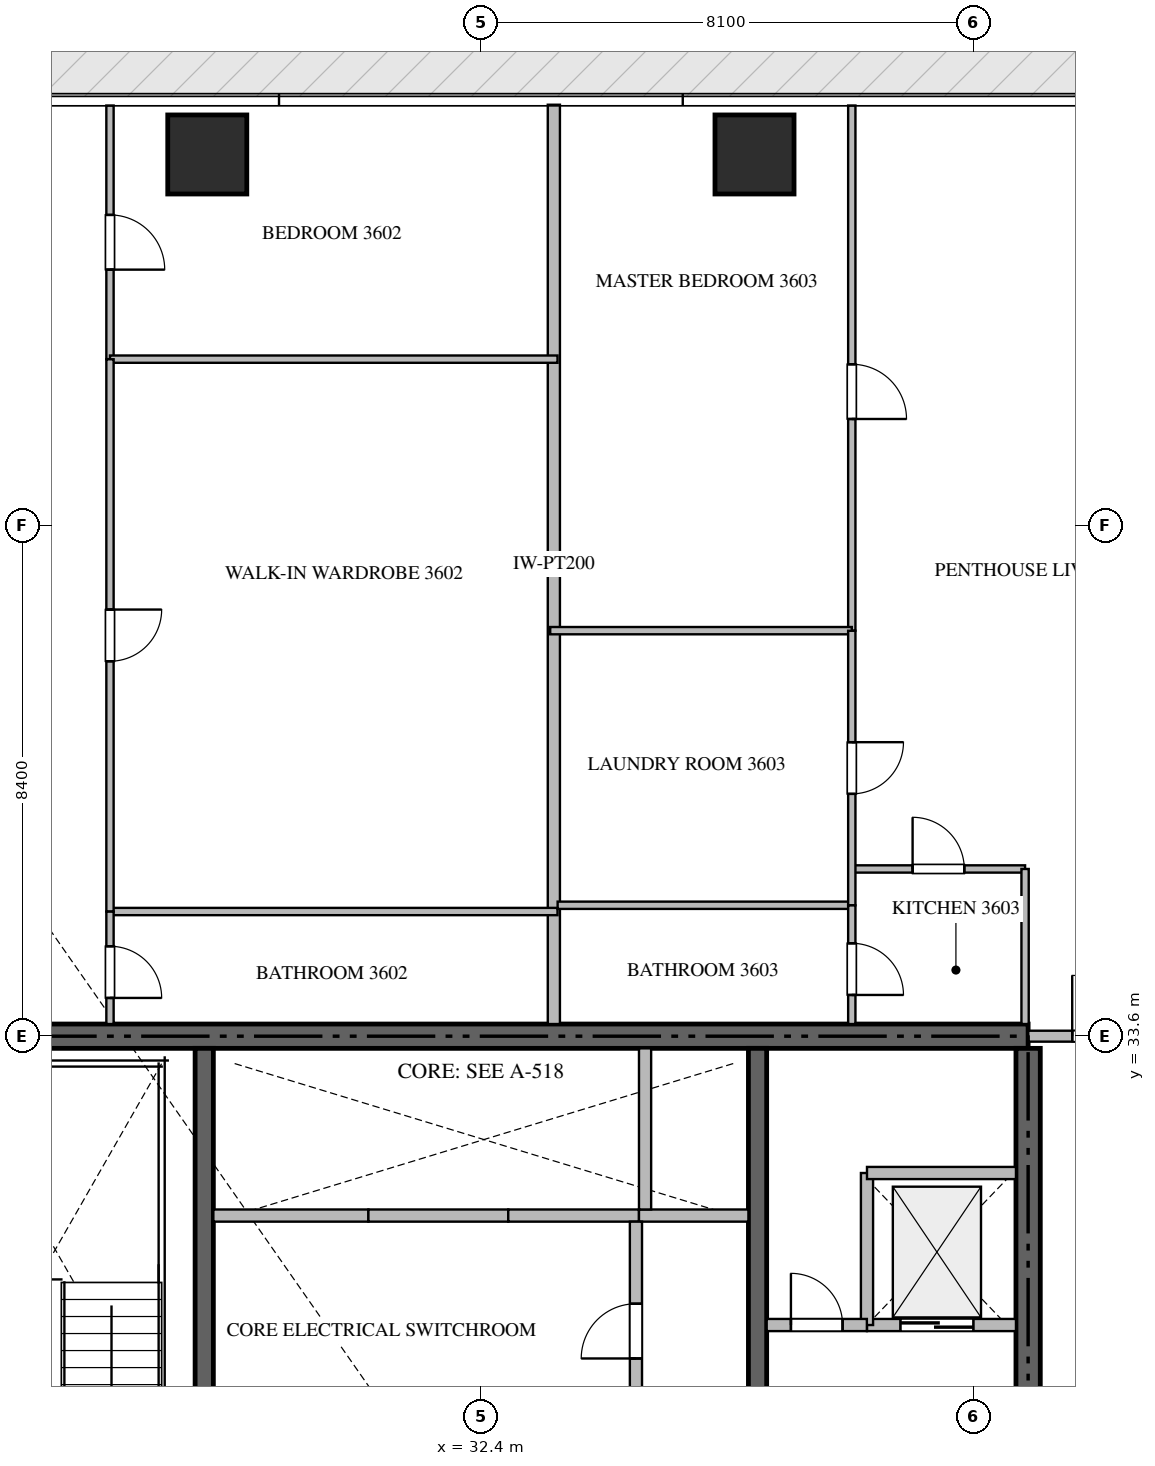
"""IFC4 building model, lengths in metres.
Left out: names, types, materials, properties, quantities, classifications, styles, units other than length and angle.
Written with IfcOpenShell. Run it as: python <this file> out.ifc"""

import sys

from ifc_helpers import new_model, si_unit, direction, frame, frame_2d, origin, origin_2d, place, context, subcontext, project, spatial, rectangle, extrude, source, transform, mapped, element, fill, save


model = new_model("IFC4")
c1 = context("Model", 3, precision=1e-05, world=origin(), true_north=direction((0.0, 1.0)))
c2 = subcontext(c1, "Body", "Model", "MODEL_VIEW")
j1 = project(units=[si_unit("LENGTHUNIT", "METRE"), si_unit("PLANEANGLEUNIT", "RADIAN")], contexts=[c1])
p1 = place(None, origin())
s1 = spatial("IfcSite", under=j1, at=p1, CompositionType="ELEMENT")
p2 = place(p1, origin())
s2 = spatial("IfcBuilding", under=s1, at=p2, CompositionType="ELEMENT")
p3 = place(p2, frame((0.0, 0.0, 146.4)))
s3 = spatial("IfcBuildingStorey", under=s2, at=p3, CompositionType="ELEMENT", Elevation=146.4)
p4 = place(p3, frame((41.4, 33.6, -0.26), z_axis=(0.0, 0.0, 1.0), x_axis=(-1.0, 0.0, 0.0)))
e1 = element("IfcWall", 1, at=p4, inside=s3, PredefinedType="SHEAR", context=c2, shape_type="SweptSolid", body=[
    extrude(rectangle(XDim=18.0, YDim=0.4, at=frame_2d((9.0, 0.0))), origin(), (0.0, 0.0, 1.0), 3.748),
])
p5 = place(p3, frame((41.4, 27.75, -0.26), z_axis=(0.0, 0.0, 1.0), x_axis=(0.0, 1.0, 0.0)))
e2 = element("IfcWall", 2, at=p5, inside=s3, PredefinedType="SHEAR", context=c2, shape_type="SweptSolid", body=[
    extrude(rectangle(XDim=5.65, YDim=0.4, at=frame_2d((2.825, 0.0))), origin(), (0.0, 0.0, 1.0), 3.748),
])
p6 = place(p3, frame((27.85, 23.55, -0.26), z_axis=(0.0, 0.0, 1.0), x_axis=(0.0, 1.0, 0.0)))
e3 = element("IfcWall", 3, at=p6, inside=s3, PredefinedType="SHEAR", context=c2, shape_type="SweptSolid", body=[
    extrude(rectangle(XDim=9.85, YDim=0.3, at=frame_2d((4.925, 0.0))), origin(), (0.0, 0.0, 1.0), 3.748),
])
p7 = place(p3, frame((36.95, 27.05, -0.26), z_axis=(0.0, 0.0, 1.0), x_axis=(0.0, 1.0, 0.0)))
e4 = element("IfcWall", 4, at=p7, inside=s3, PredefinedType="SHEAR", context=c2, shape_type="SweptSolid", body=[
    extrude(rectangle(XDim=6.35, YDim=0.3, at=frame_2d((3.175, 0.0))), origin(), (0.0, 0.0, 1.0), 3.748),
])
m1 = source(origin(), c2, "Body", "SweptSolid", [
    extrude(rectangle(XDim=1.3, YDim=1.3, at=origin_2d()), origin(), (0.0, 0.0, 1.0), 3.75),
])
for number, where, z_axis, x_axis in (
    (5, (27.9, 48.1, -0.26), (0.0, 0.0, 1.0), (1.0, 0.0, 0.0)),
    (6, (36.9, 48.1, -0.26), (0.0, 0.0, 1.0), (1.0, 0.0, 0.0)),
):
    element("IfcColumn", number, at=place(p3, frame(where, z_axis=z_axis, x_axis=x_axis)), inside=s3, PredefinedType="COLUMN", context=c2, shape_type="MappedRepresentation", body=[
        mapped(m1, transform((0.0, 0.0, 0.0), scale=1.0)),
    ])
p8 = place(p3, frame((38.75, 28.85, 0.0), z_axis=(0.0, 0.0, 1.0), x_axis=(1.0, 0.0, 0.0)))
e7 = element("IfcWall", 7, at=p8, inside=s3, PredefinedType="STANDARD", context=c2, shape_type="SweptSolid", body=[
    extrude(rectangle(XDim=2.45, YDim=0.2, at=frame_2d((1.225, 0.0))), origin(), (0.0, 0.0, 1.0), 3.49),
])
p9 = place(p8, frame((0.55, 0.0, 0.0)))
e8 = element("IfcOpeningElement", 8, at=p9, cuts=e7, PredefinedType="OPENING", context=c2, shape_type="SweptSolid", body=[
    extrude(rectangle(XDim=1.2, YDim=2.2, at=frame_2d((0.6, 1.1))), frame((0.0, 0.11, 0.0), z_axis=(0.0, -1.0, 0.0), x_axis=(1.0, 0.0, 0.0)), (0.0, 0.0, 1.0), 0.22),
])
p10 = place(p3, frame((28.0, 30.65, 0.0), z_axis=(0.0, 0.0, 1.0), x_axis=(1.0, 0.0, 0.0)))
e9 = element("IfcWall", 9, at=p10, inside=s3, PredefinedType="STANDARD", context=c2, shape_type="SweptSolid", body=[
    extrude(rectangle(XDim=2.55, YDim=0.2, at=frame_2d((1.275, 0.0))), origin(), (0.0, 0.0, 1.0), 3.49),
])
p11 = place(p3, frame((30.55, 30.65, 0.0), z_axis=(0.0, 0.0, 1.0), x_axis=(1.0, 0.0, 0.0)))
e10 = element("IfcWall", 10, at=p11, inside=s3, PredefinedType="STANDARD", context=c2, shape_type="SweptSolid", body=[
    extrude(rectangle(XDim=2.3, YDim=0.2, at=frame_2d((1.15, 0.0))), origin(), (0.0, 0.0, 1.0), 3.49),
])
p12 = place(p3, frame((32.85, 30.65, 0.0), z_axis=(0.0, 0.0, 1.0), x_axis=(1.0, 0.0, 0.0)))
e11 = element("IfcWall", 11, at=p12, inside=s3, PredefinedType="STANDARD", context=c2, shape_type="SweptSolid", body=[
    extrude(rectangle(XDim=2.15, YDim=0.2, at=frame_2d((1.075, 0.0))), origin(), (0.0, 0.0, 1.0), 3.49),
])
p13 = place(p3, frame((35.0, 30.65, 0.0), z_axis=(0.0, 0.0, 1.0), x_axis=(1.0, 0.0, 0.0)))
e12 = element("IfcWall", 12, at=p13, inside=s3, PredefinedType="STANDARD", context=c2, shape_type="SweptSolid", body=[
    extrude(rectangle(XDim=1.8, YDim=0.2, at=frame_2d((0.9, 0.0))), origin(), (0.0, 0.0, 1.0), 3.49),
])
p14 = place(p3, frame((35.1, 30.75, 0.0), z_axis=(0.0, 0.0, 1.0), x_axis=(0.0, 1.0, 0.0)))
e13 = element("IfcWall", 13, at=p14, inside=s3, PredefinedType="STANDARD", context=c2, shape_type="SweptSolid", body=[
    extrude(rectangle(XDim=2.65, YDim=0.2, at=frame_2d((1.325, 0.0))), origin(), (0.0, 0.0, 1.0), 3.49),
])
p15 = place(p3, frame((38.75, 28.85, 0.0), z_axis=(0.0, 0.0, 1.0), x_axis=(0.0, 1.0, 0.0)))
e14 = element("IfcWall", 14, at=p15, inside=s3, PredefinedType="STANDARD", context=c2, shape_type="SweptSolid", body=[
    extrude(rectangle(XDim=2.5, YDim=0.2, at=frame_2d((1.25, 0.0))), origin(), (0.0, 0.0, 1.0), 3.49),
])
p16 = place(p3, frame((38.75, 31.35, 0.0), z_axis=(0.0, 0.0, 1.0), x_axis=(1.0, 0.0, 0.0)))
e15 = element("IfcWall", 15, at=p16, inside=s3, PredefinedType="STANDARD", context=c2, shape_type="SweptSolid", body=[
    extrude(rectangle(XDim=2.45, YDim=0.2, at=frame_2d((1.225, 0.0))), origin(), (0.0, 0.0, 1.0), 3.49),
])
p17 = place(p3, frame((37.1, 28.85, 0.0), z_axis=(0.0, 0.0, 1.0), x_axis=(1.0, 0.0, 0.0)))
e16 = element("IfcWall", 16, at=p17, inside=s3, PredefinedType="STANDARD", context=c2, shape_type="SweptSolid", body=[
    extrude(rectangle(XDim=1.648, YDim=0.2, at=frame_2d((0.824, 0.0))), origin(), (0.0, 0.0, 1.0), 3.49),
])
p18 = place(p17, frame((0.399, 0.0, 0.0)))
e17 = element("IfcOpeningElement", 17, at=p18, cuts=e16, PredefinedType="OPENING", context=c2, shape_type="SweptSolid", body=[
    extrude(rectangle(XDim=0.85, YDim=2.1, at=frame_2d((0.425, 1.05))), frame((0.0, 0.11, 0.0), z_axis=(0.0, -1.0, 0.0), x_axis=(1.0, 0.0, 0.0)), (0.0, 0.0, 1.0), 0.22),
])
p19 = place(p3, frame((34.95, 26.95, 0.0), z_axis=(0.0, 0.0, 1.0), x_axis=(0.0, 1.0, 0.0)))
e18 = element("IfcWall", 18, at=p19, inside=s3, PredefinedType="STANDARD", context=c2, shape_type="SweptSolid", body=[
    extrude(rectangle(XDim=3.6, YDim=0.2, at=frame_2d((1.8, 0.0))), origin(), (0.0, 0.0, 1.0), 3.49),
])
p20 = place(p19, frame((1.35, 0.0, 0.0)))
e19 = element("IfcOpeningElement", 19, at=p20, cuts=e18, PredefinedType="OPENING", context=c2, shape_type="SweptSolid", body=[
    extrude(rectangle(XDim=0.9, YDim=2.1, at=frame_2d((0.45, 1.05))), frame((0.0, 0.11, 0.0), z_axis=(0.0, -1.0, 0.0), x_axis=(1.0, 0.0, 0.0)), (0.0, 0.0, 1.0), 0.22),
])
p21 = place(p3, frame((33.6, 33.8, 0.0), z_axis=(0.0, 0.0, 1.0), x_axis=(0.0, 1.0, 0.0)))
e20 = element("IfcWall", 20, at=p21, inside=s3, PredefinedType="PARTITIONING", context=c2, shape_type="SweptSolid", body=[
    extrude(rectangle(XDim=15.118, YDim=0.2, at=frame_2d((7.559, 0.0))), origin(), (0.0, 0.0, 1.0), 3.49),
])
p22 = place(p3, frame((41.402, 33.6, 0.0), z_axis=(0.0, 0.0, 1.0), x_axis=(1.0, 0.0, 0.0)))
e21 = element("IfcWall", 21, at=p22, inside=s3, PredefinedType="PARTITIONING", context=c2, shape_type="SweptSolid", body=[
    extrude(rectangle(XDim=2.446, YDim=0.18, at=frame_2d((1.223, 0.0))), origin(), (0.0, 0.0, 1.0), 3.49),
])
p23 = place(p22, frame((0.723, 0.0, 0.0)))
e22 = element("IfcOpeningElement", 22, at=p23, cuts=e21, PredefinedType="OPENING", context=c2, shape_type="SweptSolid", body=[
    extrude(rectangle(XDim=1.0, YDim=2.15, at=frame_2d((0.5, 1.075))), frame((0.0, 0.1, 0.0), z_axis=(0.0, -1.0, 0.0), x_axis=(1.0, 0.0, 0.0)), (0.0, 0.0, 1.0), 0.2),
])
p24 = place(p3, frame((26.3, 48.905, 0.0), z_axis=(0.0, 0.0, 1.0), x_axis=(0.0, -1.0, 0.0)))
e23 = element("IfcWall", 23, at=p24, inside=s3, PredefinedType="PARTITIONING", context=c2, shape_type="SweptSolid", body=[
    extrude(rectangle(XDim=4.171, YDim=0.12, at=frame_2d((2.085, 0.0))), origin(), (0.0, 0.0, 1.0), 3.49),
])
p25 = place(p24, frame((1.799, 0.0, 0.0)))
e24 = element("IfcOpeningElement", 24, at=p25, cuts=e23, PredefinedType="OPENING", context=c2, shape_type="SweptSolid", body=[
    extrude(rectangle(XDim=0.9, YDim=2.1, at=frame_2d((0.45, 1.05))), frame((0.0, 0.07, 0.0), z_axis=(0.0, -1.0, 0.0), x_axis=(1.0, 0.0, 0.0)), (0.0, 0.0, 1.0), 0.14),
])
for number, where, z_axis, x_axis in (
    (25, (26.3, 44.734, 0.0), (0.0, 0.0, 1.0), (1.0, 0.0, 0.0)),
    (26, (26.3, 35.65, 0.0), (0.0, 0.0, 1.0), (1.0, 0.0, 0.0)),
):
    element("IfcWall", number, at=place(p3, frame(where, z_axis=z_axis, x_axis=x_axis)), inside=s3, PredefinedType="PARTITIONING", context=c2, shape_type="SweptSolid", body=[
        extrude(rectangle(XDim=7.36, YDim=0.12, at=frame_2d((3.68, 0.0))), origin(), (0.0, 0.0, 1.0), 3.49),
    ])
p26 = place(p3, frame((26.3, 44.732, 0.0), z_axis=(0.0, 0.0, 1.0), x_axis=(0.0, -1.0, 0.0)))
e27 = element("IfcWall", 27, at=p26, inside=s3, PredefinedType="PARTITIONING", context=c2, shape_type="SweptSolid", body=[
    extrude(rectangle(XDim=9.082, YDim=0.12, at=frame_2d((4.541, 0.0))), origin(), (0.0, 0.0, 1.0), 3.49),
])
p27 = place(p26, frame((4.116, 0.0, 0.0)))
e28 = element("IfcOpeningElement", 28, at=p27, cuts=e27, PredefinedType="OPENING", context=c2, shape_type="SweptSolid", body=[
    extrude(rectangle(XDim=0.85, YDim=2.1, at=frame_2d((0.425, 1.05))), frame((0.0, 0.07, 0.0), z_axis=(0.0, -1.0, 0.0), x_axis=(1.0, 0.0, 0.0)), (0.0, 0.0, 1.0), 0.14),
])
p28 = place(p3, frame((26.3, 35.648, 0.0), z_axis=(0.0, 0.0, 1.0), x_axis=(0.0, -1.0, 0.0)))
e29 = element("IfcWall", 29, at=p28, inside=s3, PredefinedType="PARTITIONING", context=c2, shape_type="SweptSolid", body=[
    extrude(rectangle(XDim=1.848, YDim=0.12, at=frame_2d((0.924, 0.0))), origin(), (0.0, 0.0, 1.0), 3.49),
])
p29 = place(p28, frame((0.569, 0.0, 0.0)))
e30 = element("IfcOpeningElement", 30, at=p29, cuts=e29, PredefinedType="OPENING", context=c2, shape_type="SweptSolid", body=[
    extrude(rectangle(XDim=0.85, YDim=2.1, at=frame_2d((0.425, 1.05))), frame((0.0, 0.07, 0.0), z_axis=(0.0, -1.0, 0.0), x_axis=(1.0, 0.0, 0.0)), (0.0, 0.0, 1.0), 0.14),
])
p30 = place(p3, frame((38.5, 36.35, 0.0), z_axis=(0.0, 0.0, 1.0), x_axis=(1.0, 0.0, 0.0)))
e31 = element("IfcWall", 31, at=p30, inside=s3, PredefinedType="PARTITIONING", context=c2, shape_type="SweptSolid", body=[
    extrude(rectangle(XDim=2.85, YDim=0.12, at=frame_2d((1.425, 0.0))), origin(), (0.0, 0.0, 1.0), 3.49),
])
p31 = place(p30, frame((1.0, 0.0, 0.0)))
e32 = element("IfcOpeningElement", 32, at=p31, cuts=e31, PredefinedType="OPENING", context=c2, shape_type="SweptSolid", body=[
    extrude(rectangle(XDim=0.85, YDim=2.1, at=frame_2d((0.425, 1.05))), frame((0.0, 0.07, 0.0), z_axis=(0.0, -1.0, 0.0), x_axis=(1.0, 0.0, 0.0)), (0.0, 0.0, 1.0), 0.14),
])
p32 = place(p3, frame((41.35, 36.35, 0.0), z_axis=(0.0, 0.0, 1.0), x_axis=(0.0, -1.0, 0.0)))
e33 = element("IfcWall", 33, at=p32, inside=s3, PredefinedType="PARTITIONING", context=c2, shape_type="SweptSolid", body=[
    extrude(rectangle(XDim=2.55, YDim=0.12, at=frame_2d((1.275, 0.0))), origin(), (0.0, 0.0, 1.0), 3.49),
])
p33 = place(p3, frame((38.5, 48.905, 0.0), z_axis=(0.0, 0.0, 1.0), x_axis=(0.0, -1.0, 0.0)))
e34 = element("IfcWall", 34, at=p33, inside=s3, PredefinedType="PARTITIONING", context=c2, shape_type="SweptSolid", body=[
    extrude(rectangle(XDim=8.636, YDim=0.12, at=frame_2d((4.318, 0.0))), origin(), (0.0, 0.0, 1.0), 3.49),
])
p34 = place(p33, frame((4.255, 0.0, 0.0)))
e35 = element("IfcOpeningElement", 35, at=p34, cuts=e34, PredefinedType="OPENING", context=c2, shape_type="SweptSolid", body=[
    extrude(rectangle(XDim=0.9, YDim=2.1, at=frame_2d((0.45, 1.05))), frame((0.0, 0.07, 0.0), z_axis=(0.0, -1.0, 0.0), x_axis=(1.0, 0.0, 0.0)), (0.0, 0.0, 1.0), 0.14),
])
p35 = place(p3, frame((33.54, 40.269, 0.0), z_axis=(0.0, 0.0, 1.0), x_axis=(1.0, 0.0, 0.0)))
e36 = element("IfcWall", 36, at=p35, inside=s3, PredefinedType="PARTITIONING", context=c2, shape_type="SweptSolid", body=[
    extrude(rectangle(XDim=4.96, YDim=0.12, at=frame_2d((2.48, 0.0))), origin(), (0.0, 0.0, 1.0), 2.972),
])
p36 = place(p3, frame((33.662, 35.753, 0.0), z_axis=(0.0, 0.0, 1.0), x_axis=(1.0, 0.0, 0.0)))
e37 = element("IfcWall", 37, at=p36, inside=s3, PredefinedType="PARTITIONING", context=c2, shape_type="SweptSolid", body=[
    extrude(rectangle(XDim=4.838, YDim=0.12, at=frame_2d((2.419, 0.0))), origin(), (0.0, 0.0, 1.0), 3.49),
])
p37 = place(p3, frame((38.5, 40.267, 0.0), z_axis=(0.0, 0.0, 1.0), x_axis=(0.0, -1.0, 0.0)))
e38 = element("IfcWall", 38, at=p37, inside=s3, PredefinedType="PARTITIONING", context=c2, shape_type="SweptSolid", body=[
    extrude(rectangle(XDim=4.514, YDim=0.12, at=frame_2d((2.257, 0.0))), origin(), (0.0, 0.0, 1.0), 3.49),
])
p38 = place(p37, frame((1.832, 0.0, 0.0)))
e39 = element("IfcOpeningElement", 39, at=p38, cuts=e38, PredefinedType="OPENING", context=c2, shape_type="SweptSolid", body=[
    extrude(rectangle(XDim=0.85, YDim=2.1, at=frame_2d((0.425, 1.05))), frame((0.0, 0.07, 0.0), z_axis=(0.0, -1.0, 0.0), x_axis=(1.0, 0.0, 0.0)), (0.0, 0.0, 1.0), 0.14),
])
p39 = place(p3, frame((38.5, 35.751, 0.0), z_axis=(0.0, 0.0, 1.0), x_axis=(0.0, -1.0, 0.0)))
e40 = element("IfcWall", 40, at=p39, inside=s3, PredefinedType="PARTITIONING", context=c2, shape_type="SweptSolid", body=[
    extrude(rectangle(XDim=1.951, YDim=0.12, at=frame_2d((0.976, 0.0))), origin(), (0.0, 0.0, 1.0), 3.49),
])
p40 = place(p39, frame((0.623, 0.0, 0.0)))
e41 = element("IfcOpeningElement", 41, at=p40, cuts=e40, PredefinedType="OPENING", context=c2, shape_type="SweptSolid", body=[
    extrude(rectangle(XDim=0.85, YDim=2.1, at=frame_2d((0.425, 1.05))), frame((0.0, 0.07, 0.0), z_axis=(0.0, -1.0, 0.0), x_axis=(1.0, 0.0, 0.0)), (0.0, 0.0, 1.0), 0.14),
])
m2 = source(origin(), c2, "Body", "SweptSolid", [
    extrude(rectangle(XDim=1.2, YDim=2.2, at=frame_2d((0.6, 1.1))), frame((0.0, 0.025, 0.0), z_axis=(0.0, -1.0, 0.0), x_axis=(1.0, 0.0, 0.0)), (0.0, 0.0, 1.0), 0.05),
])
p41 = place(p9, origin())
e42 = element("IfcDoor", 42, at=p41, inside=s3, OperationType="DOUBLE_DOOR_SLIDING", PredefinedType="DOOR", context=c2, shape_type="MappedRepresentation", body=[
    mapped(m2, transform((0.0, 0.0, 0.0), scale=1.0)),
])
fill(e8, e42)
m3 = source(origin(), c2, "Body", "SweptSolid", [
    extrude(rectangle(XDim=0.85, YDim=2.1, at=frame_2d((0.425, 1.05))), frame((0.0, 0.025, 0.0), z_axis=(0.0, -1.0, 0.0), x_axis=(1.0, 0.0, 0.0)), (0.0, 0.0, 1.0), 0.05),
])
p42 = place(p18, origin())
e43 = element("IfcDoor", 43, at=p42, inside=s3, OperationType="SINGLE_SWING_LEFT", PredefinedType="DOOR", context=c2, shape_type="MappedRepresentation", body=[
    mapped(m3, transform((0.0, 0.0, 0.0), scale=1.0)),
])
fill(e17, e43)
m4 = source(origin(), c2, "Body", "SweptSolid", [
    extrude(rectangle(XDim=0.9, YDim=2.1, at=frame_2d((0.45, 1.05))), frame((0.0, 0.025, 0.0), z_axis=(0.0, -1.0, 0.0), x_axis=(1.0, 0.0, 0.0)), (0.0, 0.0, 1.0), 0.05),
])
p43 = place(p20, origin())
e44 = element("IfcDoor", 44, at=p43, inside=s3, OperationType="SINGLE_SWING_LEFT", PredefinedType="DOOR", context=c2, shape_type="MappedRepresentation", body=[
    mapped(m4, transform((0.0, 0.0, 0.0), scale=1.0)),
])
fill(e19, e44)
m5 = source(origin(), c2, "Body", "SweptSolid", [
    extrude(rectangle(XDim=1.0, YDim=2.15, at=frame_2d((0.5, 1.075))), frame((0.0, 0.025, 0.0), z_axis=(0.0, -1.0, 0.0), x_axis=(1.0, 0.0, 0.0)), (0.0, 0.0, 1.0), 0.05),
])
p44 = place(p23, origin())
e45 = element("IfcDoor", 45, at=p44, inside=s3, OperationType="SINGLE_SWING_LEFT", PredefinedType="DOOR", context=c2, shape_type="MappedRepresentation", body=[
    mapped(m5, transform((0.0, 0.0, 0.0), scale=1.0)),
])
fill(e22, e45)
p45 = place(p25, origin())
e46 = element("IfcDoor", 46, at=p45, inside=s3, OperationType="SINGLE_SWING_RIGHT", PredefinedType="DOOR", context=c2, shape_type="MappedRepresentation", body=[
    mapped(m4, transform((0.0, 0.0, 0.0), scale=1.0)),
])
fill(e24, e46)
p46 = place(p27, origin())
e47 = element("IfcDoor", 47, at=p46, inside=s3, OperationType="SINGLE_SWING_LEFT", PredefinedType="DOOR", context=c2, shape_type="MappedRepresentation", body=[
    mapped(m3, transform((0.0, 0.0, 0.0), scale=1.0)),
])
fill(e28, e47)
p47 = place(p29, origin())
e48 = element("IfcDoor", 48, at=p47, inside=s3, OperationType="SINGLE_SWING_RIGHT", PredefinedType="DOOR", context=c2, shape_type="MappedRepresentation", body=[
    mapped(m3, transform((0.0, 0.0, 0.0), scale=1.0)),
])
fill(e30, e48)
p48 = place(p31, origin())
e49 = element("IfcDoor", 49, at=p48, inside=s3, OperationType="SINGLE_SWING_LEFT", PredefinedType="DOOR", context=c2, shape_type="MappedRepresentation", body=[
    mapped(m3, transform((0.0, 0.0, 0.0), scale=1.0)),
])
fill(e32, e49)
p49 = place(p34, origin())
e50 = element("IfcDoor", 50, at=p49, inside=s3, OperationType="SINGLE_SWING_RIGHT", PredefinedType="DOOR", context=c2, shape_type="MappedRepresentation", body=[
    mapped(m4, transform((0.0, 0.0, 0.0), scale=1.0)),
])
fill(e35, e50)
p50 = place(p38, origin())
e51 = element("IfcDoor", 51, at=p50, inside=s3, OperationType="SINGLE_SWING_LEFT", PredefinedType="DOOR", context=c2, shape_type="MappedRepresentation", body=[
    mapped(m3, transform((0.0, 0.0, 0.0), scale=1.0)),
])
fill(e39, e51)
p51 = place(p40, origin())
e52 = element("IfcDoor", 52, at=p51, inside=s3, OperationType="SINGLE_SWING_RIGHT", PredefinedType="DOOR", context=c2, shape_type="MappedRepresentation", body=[
    mapped(m3, transform((0.0, 0.0, 0.0), scale=1.0)),
])
fill(e41, e52)
save(model, sys.argv[1])
